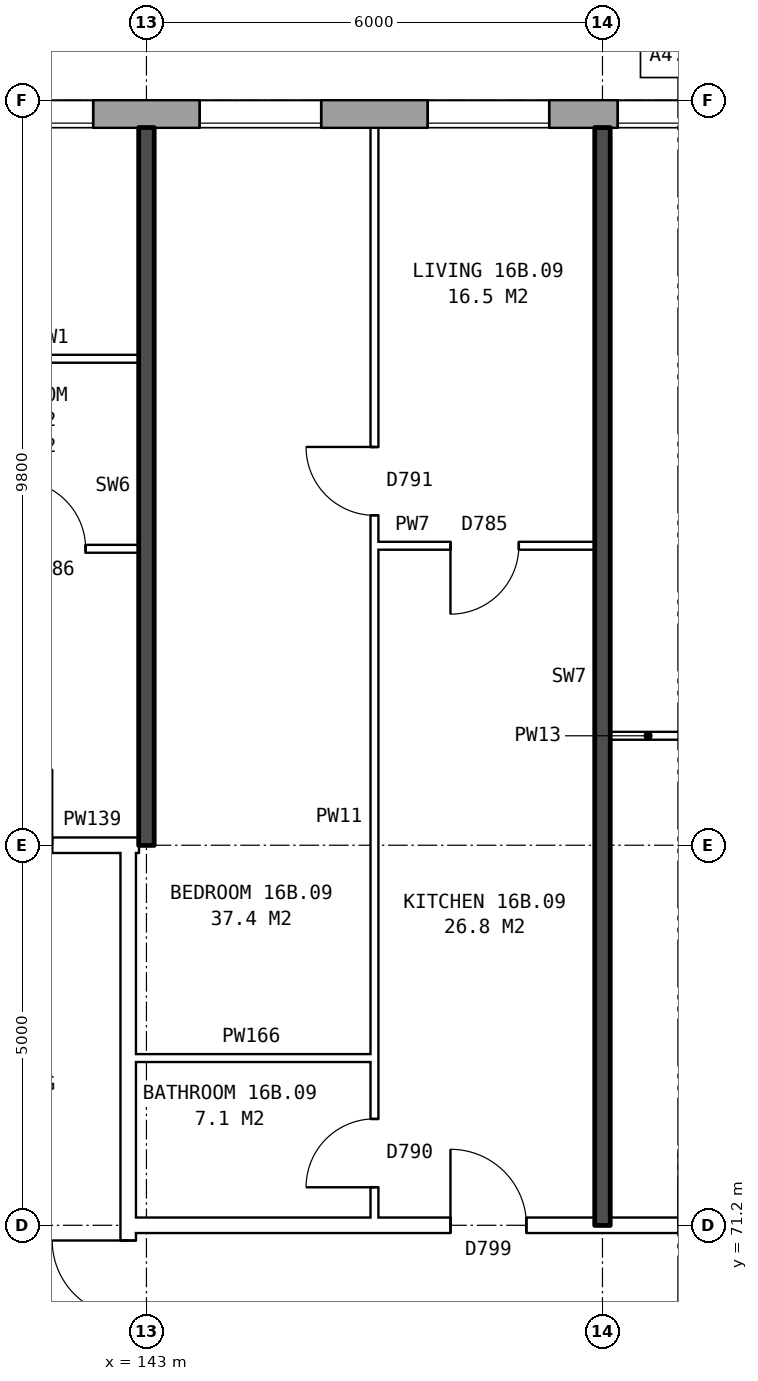
"""IFC4 building model, lengths in metres.
Left out: names, types, materials, properties, quantities, classifications, styles, units other than length and angle.
Written with IfcOpenShell. Run it as: python <this file> out.ifc"""

import sys

from ifc_helpers import new_model, si_unit, direction, frame, frame_2d, origin, place, context, subcontext, project, spatial, rectangle, extrude, element, fill, save


model = new_model("IFC4")
c1 = context("Model", 3, precision=1e-05, world=origin(), true_north=direction((0.0, 1.0)))
c2 = subcontext(c1, "Body", "Model", "MODEL_VIEW")
j1 = project(units=[si_unit("LENGTHUNIT", "METRE"), si_unit("PLANEANGLEUNIT", "RADIAN")], contexts=[c1])
p1 = place(None, origin())
s1 = spatial("IfcSite", under=j1, at=p1, CompositionType="ELEMENT")
p2 = place(p1, origin())
s2 = spatial("IfcBuilding", under=s1, at=p2, CompositionType="ELEMENT")
p3 = place(p2, frame((0.0, 0.0, 59.8)))
s3 = spatial("IfcBuildingStorey", under=s2, at=p3, CompositionType="ELEMENT", Elevation=59.8)
p4 = place(p3, frame((173.425, 85.82, 0.0), z_axis=(0.0, 0.0, 1.0), x_axis=(-1.0, 0.0, 0.0)))
e1 = element("IfcWall", 1, at=p4, inside=s3, PredefinedType="STANDARD", context=c2, shape_type="SweptSolid", body=[
    extrude(rectangle(XDim=39.351, YDim=0.36, at=frame_2d((19.675, 0.0))), origin(), (0.0, 0.0, 1.0), 2.85),
])
p5 = place(p4, frame((1.125, 0.0, 0.8)))
e2 = element("IfcOpeningElement", 2, at=p5, cuts=e1, PredefinedType="OPENING", context=c2, shape_type="SweptSolid", body=[
    extrude(rectangle(XDim=1.6, YDim=1.8, at=frame_2d((0.8, 0.9))), frame((0.0, 0.19, 0.0), z_axis=(0.0, -1.0, 0.0), x_axis=(1.0, 0.0, 0.0)), (0.0, 0.0, 1.0), 0.38),
])
p6 = place(p4, frame((4.125, 0.0, 0.8)))
e3 = element("IfcOpeningElement", 3, at=p6, cuts=e1, PredefinedType="OPENING", context=c2, shape_type="SweptSolid", body=[
    extrude(rectangle(XDim=1.6, YDim=1.8, at=frame_2d((0.8, 0.9))), frame((0.0, 0.19, 0.0), z_axis=(0.0, -1.0, 0.0), x_axis=(1.0, 0.0, 0.0)), (0.0, 0.0, 1.0), 0.38),
])
p7 = place(p4, frame((7.125, 0.0, 0.8)))
e4 = element("IfcOpeningElement", 4, at=p7, cuts=e1, PredefinedType="OPENING", context=c2, shape_type="SweptSolid", body=[
    extrude(rectangle(XDim=1.6, YDim=1.8, at=frame_2d((0.8, 0.9))), frame((0.0, 0.19, 0.0), z_axis=(0.0, -1.0, 0.0), x_axis=(1.0, 0.0, 0.0)), (0.0, 0.0, 1.0), 0.38),
])
p8 = place(p4, frame((10.125, 0.0, 0.8)))
e5 = element("IfcOpeningElement", 5, at=p8, cuts=e1, PredefinedType="OPENING", context=c2, shape_type="SweptSolid", body=[
    extrude(rectangle(XDim=1.6, YDim=1.8, at=frame_2d((0.8, 0.9))), frame((0.0, 0.19, 0.0), z_axis=(0.0, -1.0, 0.0), x_axis=(1.0, 0.0, 0.0)), (0.0, 0.0, 1.0), 0.38),
])
p9 = place(p4, frame((13.125, 0.0, 0.8)))
e6 = element("IfcOpeningElement", 6, at=p9, cuts=e1, PredefinedType="OPENING", context=c2, shape_type="SweptSolid", body=[
    extrude(rectangle(XDim=1.6, YDim=1.8, at=frame_2d((0.8, 0.9))), frame((0.0, 0.19, 0.0), z_axis=(0.0, -1.0, 0.0), x_axis=(1.0, 0.0, 0.0)), (0.0, 0.0, 1.0), 0.38),
])
p10 = place(p4, frame((15.025, 0.0, 0.8)))
e7 = element("IfcOpeningElement", 7, at=p10, cuts=e1, PredefinedType="OPENING", context=c2, shape_type="SweptSolid", body=[
    extrude(rectangle(XDim=1.0, YDim=1.8, at=frame_2d((0.5, 0.9))), frame((0.0, 0.19, 0.0), z_axis=(0.0, -1.0, 0.0), x_axis=(1.0, 0.0, 0.0)), (0.0, 0.0, 1.0), 0.38),
])
p11 = place(p4, frame((18.625, 0.0, 0.15)))
e8 = element("IfcOpeningElement", 8, at=p11, cuts=e1, PredefinedType="OPENING", context=c2, shape_type="SweptSolid", body=[
    extrude(rectangle(XDim=1.4, YDim=1.2, at=frame_2d((0.7, 0.6))), frame((0.0, 0.19, 0.0), z_axis=(0.0, -1.0, 0.0), x_axis=(1.0, 0.0, 0.0)), (0.0, 0.0, 1.0), 0.38),
])
p12 = place(p4, frame((21.575, 0.0, 1.7)))
e9 = element("IfcOpeningElement", 9, at=p12, cuts=e1, PredefinedType="OPENING", context=c2, shape_type="SweptSolid", body=[
    extrude(rectangle(XDim=0.6, YDim=0.9, at=frame_2d((0.3, 0.45))), frame((0.0, 0.19, 0.0), z_axis=(0.0, -1.0, 0.0), x_axis=(1.0, 0.0, 0.0)), (0.0, 0.0, 1.0), 0.38),
])
p13 = place(p4, frame((25.125, 0.0, 0.8)))
e10 = element("IfcOpeningElement", 10, at=p13, cuts=e1, PredefinedType="OPENING", context=c2, shape_type="SweptSolid", body=[
    extrude(rectangle(XDim=1.6, YDim=1.8, at=frame_2d((0.8, 0.9))), frame((0.0, 0.19, 0.0), z_axis=(0.0, -1.0, 0.0), x_axis=(1.0, 0.0, 0.0)), (0.0, 0.0, 1.0), 0.38),
])
p14 = place(p4, frame((28.125, 0.0, 0.8)))
e11 = element("IfcOpeningElement", 11, at=p14, cuts=e1, PredefinedType="OPENING", context=c2, shape_type="SweptSolid", body=[
    extrude(rectangle(XDim=1.6, YDim=1.8, at=frame_2d((0.8, 0.9))), frame((0.0, 0.19, 0.0), z_axis=(0.0, -1.0, 0.0), x_axis=(1.0, 0.0, 0.0)), (0.0, 0.0, 1.0), 0.38),
])
p15 = place(p4, frame((31.125, 0.0, 0.8)))
e12 = element("IfcOpeningElement", 12, at=p15, cuts=e1, PredefinedType="OPENING", context=c2, shape_type="SweptSolid", body=[
    extrude(rectangle(XDim=1.6, YDim=1.8, at=frame_2d((0.8, 0.9))), frame((0.0, 0.19, 0.0), z_axis=(0.0, -1.0, 0.0), x_axis=(1.0, 0.0, 0.0)), (0.0, 0.0, 1.0), 0.38),
])
p16 = place(p4, frame((34.125, 0.0, 0.8)))
e13 = element("IfcOpeningElement", 13, at=p16, cuts=e1, PredefinedType="OPENING", context=c2, shape_type="SweptSolid", body=[
    extrude(rectangle(XDim=1.6, YDim=1.8, at=frame_2d((0.8, 0.9))), frame((0.0, 0.19, 0.0), z_axis=(0.0, -1.0, 0.0), x_axis=(1.0, 0.0, 0.0)), (0.0, 0.0, 1.0), 0.38),
])
p17 = place(p4, frame((37.125, 0.0, 0.8)))
e14 = element("IfcOpeningElement", 14, at=p17, cuts=e1, PredefinedType="OPENING", context=c2, shape_type="SweptSolid", body=[
    extrude(rectangle(XDim=1.6, YDim=1.8, at=frame_2d((0.8, 0.9))), frame((0.0, 0.19, 0.0), z_axis=(0.0, -1.0, 0.0), x_axis=(1.0, 0.0, 0.0)), (0.0, 0.0, 1.0), 0.38),
])
p18 = place(p4, frame((16.325, 0.0, 1.0)))
e15 = element("IfcOpeningElement", 15, at=p18, cuts=e1, PredefinedType="OPENING", context=c2, shape_type="SweptSolid", body=[
    extrude(rectangle(XDim=0.6, YDim=1.5, at=frame_2d((0.3, 0.75))), frame((0.0, 0.19, 0.0), z_axis=(0.0, -1.0, 0.0), x_axis=(1.0, 0.0, 0.0)), (0.0, 0.0, 1.0), 0.38),
])
p19 = place(p4, frame((17.225, 0.0, 1.7)))
e16 = element("IfcOpeningElement", 16, at=p19, cuts=e1, PredefinedType="OPENING", context=c2, shape_type="SweptSolid", body=[
    extrude(rectangle(XDim=0.6, YDim=0.9, at=frame_2d((0.3, 0.45))), frame((0.0, 0.19, 0.0), z_axis=(0.0, -1.0, 0.0), x_axis=(1.0, 0.0, 0.0)), (0.0, 0.0, 1.0), 0.38),
])
p20 = place(p4, frame((20.325, 0.0, 0.25)))
e17 = element("IfcOpeningElement", 17, at=p20, cuts=e1, PredefinedType="OPENING", context=c2, shape_type="SweptSolid", body=[
    extrude(rectangle(XDim=0.6, YDim=0.9, at=frame_2d((0.3, 0.45))), frame((0.0, 0.19, 0.0), z_axis=(0.0, -1.0, 0.0), x_axis=(1.0, 0.0, 0.0)), (0.0, 0.0, 1.0), 0.38),
])
p21 = place(p4, frame((22.625, 0.0, 0.8)))
e18 = element("IfcOpeningElement", 18, at=p21, cuts=e1, PredefinedType="OPENING", context=c2, shape_type="SweptSolid", body=[
    extrude(rectangle(XDim=1.6, YDim=1.8, at=frame_2d((0.8, 0.9))), frame((0.0, 0.19, 0.0), z_axis=(0.0, -1.0, 0.0), x_axis=(1.0, 0.0, 0.0)), (0.0, 0.0, 1.0), 0.38),
])
p22 = place(p3, frame((142.76, 63.9, 0.0), z_axis=(0.0, 0.0, 1.0), x_axis=(0.0, 1.0, 0.0)))
e19 = element("IfcWall", 19, at=p22, inside=s3, PredefinedType="PARTITIONING", context=c2, shape_type="SweptSolid", body=[
    extrude(rectangle(XDim=12.2, YDim=0.2, at=frame_2d((6.1, 0.0))), origin(), (0.0, 0.0, 1.0), 2.85),
])
p23 = place(p22, frame((5.1, 0.0, 0.0)))
e20 = element("IfcOpeningElement", 20, at=p23, cuts=e19, PredefinedType="OPENING", context=c2, shape_type="SweptSolid", body=[
    extrude(rectangle(XDim=2.0, YDim=2.1, at=frame_2d((1.0, 1.05))), frame((0.0, 0.11, 0.0), z_axis=(0.0, -1.0, 0.0), x_axis=(1.0, 0.0, 0.0)), (0.0, 0.0, 1.0), 0.22),
])
p24 = place(p3, frame((142.76, 71.2, 0.0), z_axis=(0.0, 0.0, 1.0), x_axis=(1.0, 0.0, 0.0)))
e21 = element("IfcWall", 21, at=p24, inside=s3, PredefinedType="PARTITIONING", context=c2, shape_type="SweptSolid", body=[
    extrude(rectangle(XDim=14.48, YDim=0.2, at=frame_2d((7.24, 0.0))), origin(), (0.0, 0.0, 1.0), 2.85),
])
p25 = place(p24, frame((4.24, 0.0, 0.0)))
e22 = element("IfcOpeningElement", 22, at=p25, cuts=e21, PredefinedType="OPENING", context=c2, shape_type="SweptSolid", body=[
    extrude(rectangle(XDim=1.0, YDim=2.1, at=frame_2d((0.5, 1.05))), frame((0.0, 0.11, 0.0), z_axis=(0.0, -1.0, 0.0), x_axis=(1.0, 0.0, 0.0)), (0.0, 0.0, 1.0), 0.22),
])
p26 = place(p24, frame((7.24, 0.0, 0.0)))
e23 = element("IfcOpeningElement", 23, at=p26, cuts=e21, PredefinedType="OPENING", context=c2, shape_type="SweptSolid", body=[
    extrude(rectangle(XDim=1.0, YDim=2.1, at=frame_2d((0.5, 1.05))), frame((0.0, 0.11, 0.0), z_axis=(0.0, -1.0, 0.0), x_axis=(1.0, 0.0, 0.0)), (0.0, 0.0, 1.0), 0.22),
])
p27 = place(p3, frame((142.76, 73.4, 0.0), z_axis=(0.0, 0.0, 1.0), x_axis=(1.0, 0.0, 0.0)))
e24 = element("IfcWall", 24, at=p27, inside=s3, PredefinedType="PARTITIONING", context=c2, shape_type="SweptSolid", body=[
    extrude(rectangle(XDim=3.24, YDim=0.1, at=frame_2d((1.62, 0.0))), origin(), (0.0, 0.0, 1.0), 2.85),
])
p28 = place(p3, frame((139.76, 76.2, 0.0), z_axis=(0.0, 0.0, 1.0), x_axis=(1.0, 0.0, 0.0)))
e25 = element("IfcWall", 25, at=p28, inside=s3, PredefinedType="PARTITIONING", context=c2, shape_type="SweptSolid", body=[
    extrude(rectangle(XDim=3.0, YDim=0.2, at=frame_2d((1.5, 0.0))), origin(), (0.0, 0.0, 1.0), 2.85),
])
p29 = place(p28, frame((1.0, 0.0, 0.0)))
e26 = element("IfcOpeningElement", 26, at=p29, cuts=e25, PredefinedType="OPENING", context=c2, shape_type="SweptSolid", body=[
    extrude(rectangle(XDim=1.0, YDim=2.1, at=frame_2d((0.5, 1.05))), frame((0.0, 0.11, 0.0), z_axis=(0.0, -1.0, 0.0), x_axis=(1.0, 0.0, 0.0)), (0.0, 0.0, 1.0), 0.22),
])
p30 = place(p3, frame((142.76, 76.2, 0.0), z_axis=(0.0, 0.0, 1.0), x_axis=(1.0, 0.0, 0.0)))
e27 = element("IfcWall", 27, at=p30, inside=s3, PredefinedType="PARTITIONING", context=c2, shape_type="SweptSolid", body=[
    extrude(rectangle(XDim=0.14, YDim=0.2, at=frame_2d((0.07, 0.0))), origin(), (0.0, 0.0, 1.0), 2.85),
])
p31 = place(p3, frame((149.1, 77.64, 0.0), z_axis=(0.0, 0.0, 1.0), x_axis=(1.0, 0.0, 0.0)))
e28 = element("IfcWall", 28, at=p31, inside=s3, PredefinedType="PARTITIONING", context=c2, shape_type="SweptSolid", body=[
    extrude(rectangle(XDim=2.9, YDim=0.1, at=frame_2d((1.45, 0.0))), origin(), (0.0, 0.0, 1.0), 2.85),
])
p32 = place(p31, frame((1.0, 0.0, 0.0)))
e29 = element("IfcOpeningElement", 29, at=p32, cuts=e28, PredefinedType="OPENING", context=c2, shape_type="SweptSolid", body=[
    extrude(rectangle(XDim=0.9, YDim=2.1, at=frame_2d((0.45, 1.05))), frame((0.0, 0.06, 0.0), z_axis=(0.0, -1.0, 0.0), x_axis=(1.0, 0.0, 0.0)), (0.0, 0.0, 1.0), 0.12),
])
p33 = place(p3, frame((137.1, 80.1, 0.0), z_axis=(0.0, 0.0, 1.0), x_axis=(1.0, 0.0, 0.0)))
e30 = element("IfcWall", 30, at=p33, inside=s3, PredefinedType="PARTITIONING", context=c2, shape_type="SweptSolid", body=[
    extrude(rectangle(XDim=5.8, YDim=0.1, at=frame_2d((2.9, 0.0))), origin(), (0.0, 0.0, 1.0), 2.85),
])
p34 = place(p33, frame((1.3, 0.0, 0.0)))
e31 = element("IfcOpeningElement", 31, at=p34, cuts=e30, PredefinedType="OPENING", context=c2, shape_type="SweptSolid", body=[
    extrude(rectangle(XDim=0.9, YDim=2.1, at=frame_2d((0.45, 1.05))), frame((0.0, 0.06, 0.0), z_axis=(0.0, -1.0, 0.0), x_axis=(1.0, 0.0, 0.0)), (0.0, 0.0, 1.0), 0.12),
])
p35 = place(p33, frame((4.2, 0.0, 0.0)))
e32 = element("IfcOpeningElement", 32, at=p35, cuts=e30, PredefinedType="OPENING", context=c2, shape_type="SweptSolid", body=[
    extrude(rectangle(XDim=0.9, YDim=2.1, at=frame_2d((0.45, 1.05))), frame((0.0, 0.06, 0.0), z_axis=(0.0, -1.0, 0.0), x_axis=(1.0, 0.0, 0.0)), (0.0, 0.0, 1.0), 0.12),
])
p36 = place(p3, frame((146.0, 80.14, 0.0), z_axis=(0.0, 0.0, 1.0), x_axis=(1.0, 0.0, 0.0)))
e33 = element("IfcWall", 33, at=p36, inside=s3, PredefinedType="PARTITIONING", context=c2, shape_type="SweptSolid", body=[
    extrude(rectangle(XDim=2.9, YDim=0.1, at=frame_2d((1.45, 0.0))), origin(), (0.0, 0.0, 1.0), 2.85),
])
p37 = place(p36, frame((1.0, 0.0, 0.0)))
e34 = element("IfcOpeningElement", 34, at=p37, cuts=e33, PredefinedType="OPENING", context=c2, shape_type="SweptSolid", body=[
    extrude(rectangle(XDim=0.9, YDim=2.1, at=frame_2d((0.45, 1.05))), frame((0.0, 0.06, 0.0), z_axis=(0.0, -1.0, 0.0), x_axis=(1.0, 0.0, 0.0)), (0.0, 0.0, 1.0), 0.12),
])
p38 = place(p3, frame((140.6, 82.6, 0.0), z_axis=(0.0, 0.0, 1.0), x_axis=(1.0, 0.0, 0.0)))
e35 = element("IfcWall", 35, at=p38, inside=s3, PredefinedType="PARTITIONING", context=c2, shape_type="SweptSolid", body=[
    extrude(rectangle(XDim=2.3, YDim=0.1, at=frame_2d((1.15, 0.0))), origin(), (0.0, 0.0, 1.0), 2.85),
])
p39 = place(p3, frame((143.0, 76.2, 0.0), z_axis=(0.0, 0.0, 1.0), x_axis=(0.0, 1.0, 0.0)))
e36 = element("IfcWall", 36, at=p39, inside=s3, PredefinedType="SOLIDWALL", context=c2, shape_type="SweptSolid", body=[
    extrude(rectangle(XDim=9.44, YDim=0.2, at=frame_2d((4.72, 0.0))), origin(), (0.0, 0.0, 1.0), 2.85),
])
p40 = place(p3, frame((146.0, 71.3, 0.0), z_axis=(0.0, 0.0, 1.0), x_axis=(0.0, 1.0, 0.0)))
e37 = element("IfcWall", 37, at=p40, inside=s3, PredefinedType="PARTITIONING", context=c2, shape_type="SweptSolid", body=[
    extrude(rectangle(XDim=14.34, YDim=0.1, at=frame_2d((7.17, 0.0))), origin(), (0.0, 0.0, 1.0), 2.85),
])
p41 = place(p40, frame((9.24, 0.0, 0.0)))
e38 = element("IfcOpeningElement", 38, at=p41, cuts=e37, PredefinedType="OPENING", context=c2, shape_type="SweptSolid", body=[
    extrude(rectangle(XDim=0.9, YDim=2.1, at=frame_2d((0.45, 1.05))), frame((0.0, 0.06, 0.0), z_axis=(0.0, -1.0, 0.0), x_axis=(1.0, 0.0, 0.0)), (0.0, 0.0, 1.0), 0.12),
])
p42 = place(p40, frame((0.4, 0.0, 0.0)))
e39 = element("IfcOpeningElement", 39, at=p42, cuts=e37, PredefinedType="OPENING", context=c2, shape_type="SweptSolid", body=[
    extrude(rectangle(XDim=0.9, YDim=2.1, at=frame_2d((0.45, 1.05))), frame((0.0, 0.06, 0.0), z_axis=(0.0, -1.0, 0.0), x_axis=(1.0, 0.0, 0.0)), (0.0, 0.0, 1.0), 0.12),
])
p43 = place(p3, frame((149.0, 71.2, 0.0), z_axis=(0.0, 0.0, 1.0), x_axis=(0.0, 1.0, 0.0)))
e40 = element("IfcWall", 40, at=p43, inside=s3, PredefinedType="SOLIDWALL", context=c2, shape_type="SweptSolid", body=[
    extrude(rectangle(XDim=14.44, YDim=0.2, at=frame_2d((7.22, 0.0))), origin(), (0.0, 0.0, 1.0), 2.85),
])
p44 = place(p13, origin())
e41 = element("IfcWindow", 41, at=p44, inside=s3, PartitioningType="SINGLE_PANEL", PredefinedType="WINDOW", context=c2, shape_type="SweptSolid", body=[
    extrude(rectangle(XDim=1.6, YDim=1.8, at=frame_2d((0.8, 0.9))), frame((0.0, 0.15, 0.0), z_axis=(0.0, -1.0, 0.0), x_axis=(1.0, 0.0, 0.0)), (0.0, 0.0, 1.0), 0.06),
])
fill(e10, e41)
p45 = place(p14, origin())
e42 = element("IfcWindow", 42, at=p45, inside=s3, PartitioningType="SINGLE_PANEL", PredefinedType="WINDOW", context=c2, shape_type="SweptSolid", body=[
    extrude(rectangle(XDim=1.6, YDim=1.8, at=frame_2d((0.8, 0.9))), frame((0.0, 0.15, 0.0), z_axis=(0.0, -1.0, 0.0), x_axis=(1.0, 0.0, 0.0)), (0.0, 0.0, 1.0), 0.06),
])
fill(e11, e42)
p46 = place(p15, origin())
e43 = element("IfcWindow", 43, at=p46, inside=s3, PartitioningType="SINGLE_PANEL", PredefinedType="WINDOW", context=c2, shape_type="SweptSolid", body=[
    extrude(rectangle(XDim=1.6, YDim=1.8, at=frame_2d((0.8, 0.9))), frame((0.0, 0.15, 0.0), z_axis=(0.0, -1.0, 0.0), x_axis=(1.0, 0.0, 0.0)), (0.0, 0.0, 1.0), 0.06),
])
fill(e12, e43)
p47 = place(p23, origin())
e44 = element("IfcDoor", 44, at=p47, inside=s3, OperationType="DOUBLE_DOOR_SINGLE_SWING", PredefinedType="DOOR", context=c2, shape_type="SweptSolid", body=[
    extrude(rectangle(XDim=2.0, YDim=2.1, at=frame_2d((1.0, 1.05))), frame((0.0, 0.025, 0.0), z_axis=(0.0, -1.0, 0.0), x_axis=(1.0, 0.0, 0.0)), (0.0, 0.0, 1.0), 0.05),
])
fill(e20, e44)
p48 = place(p35, origin())
e45 = element("IfcDoor", 45, at=p48, inside=s3, OperationType="SINGLE_SWING_LEFT", PredefinedType="DOOR", context=c2, shape_type="SweptSolid", body=[
    extrude(rectangle(XDim=0.9, YDim=2.1, at=frame_2d((0.45, 1.05))), frame((0.0, 0.025, 0.0), z_axis=(0.0, -1.0, 0.0), x_axis=(1.0, 0.0, 0.0)), (0.0, 0.0, 1.0), 0.05),
])
fill(e32, e45)
p49 = place(p41, origin())
e46 = element("IfcDoor", 46, at=p49, inside=s3, OperationType="SINGLE_SWING_RIGHT", PredefinedType="DOOR", context=c2, shape_type="SweptSolid", body=[
    extrude(rectangle(XDim=0.9, YDim=2.1, at=frame_2d((0.45, 1.05))), frame((0.0, 0.025, 0.0), z_axis=(0.0, -1.0, 0.0), x_axis=(1.0, 0.0, 0.0)), (0.0, 0.0, 1.0), 0.05),
])
fill(e38, e46)
p50 = place(p25, origin())
e47 = element("IfcDoor", 47, at=p50, inside=s3, OperationType="SINGLE_SWING_LEFT", PredefinedType="DOOR", context=c2, shape_type="SweptSolid", body=[
    extrude(rectangle(XDim=1.0, YDim=2.1, at=frame_2d((0.5, 1.05))), frame((0.0, 0.025, 0.0), z_axis=(0.0, -1.0, 0.0), x_axis=(1.0, 0.0, 0.0)), (0.0, 0.0, 1.0), 0.05),
])
fill(e22, e47)
p51 = place(p37, frame((0.9, 0.0, 0.0), z_axis=(0.0, 0.0, 1.0), x_axis=(-1.0, 0.0, 0.0)))
e48 = element("IfcDoor", 48, at=p51, inside=s3, OperationType="SINGLE_SWING_RIGHT", PredefinedType="DOOR", context=c2, shape_type="SweptSolid", body=[
    extrude(rectangle(XDim=0.9, YDim=2.1, at=frame_2d((0.45, 1.05))), frame((0.0, 0.025, 0.0), z_axis=(0.0, -1.0, 0.0), x_axis=(1.0, 0.0, 0.0)), (0.0, 0.0, 1.0), 0.05),
])
fill(e34, e48)
p52 = place(p42, origin())
e49 = element("IfcDoor", 49, at=p52, inside=s3, OperationType="SINGLE_SWING_LEFT", PredefinedType="DOOR", context=c2, shape_type="SweptSolid", body=[
    extrude(rectangle(XDim=0.9, YDim=2.1, at=frame_2d((0.45, 1.05))), frame((0.0, 0.025, 0.0), z_axis=(0.0, -1.0, 0.0), x_axis=(1.0, 0.0, 0.0)), (0.0, 0.0, 1.0), 0.05),
])
fill(e39, e49)
p53 = place(p21, origin())
e50 = element("IfcWindow", 50, at=p53, inside=s3, PartitioningType="SINGLE_PANEL", PredefinedType="WINDOW", context=c2, shape_type="SweptSolid", body=[
    extrude(rectangle(XDim=1.6, YDim=1.8, at=frame_2d((0.8, 0.9))), frame((0.0, 0.15, 0.0), z_axis=(0.0, -1.0, 0.0), x_axis=(1.0, 0.0, 0.0)), (0.0, 0.0, 1.0), 0.06),
])
fill(e18, e50)
save(model, sys.argv[1])
